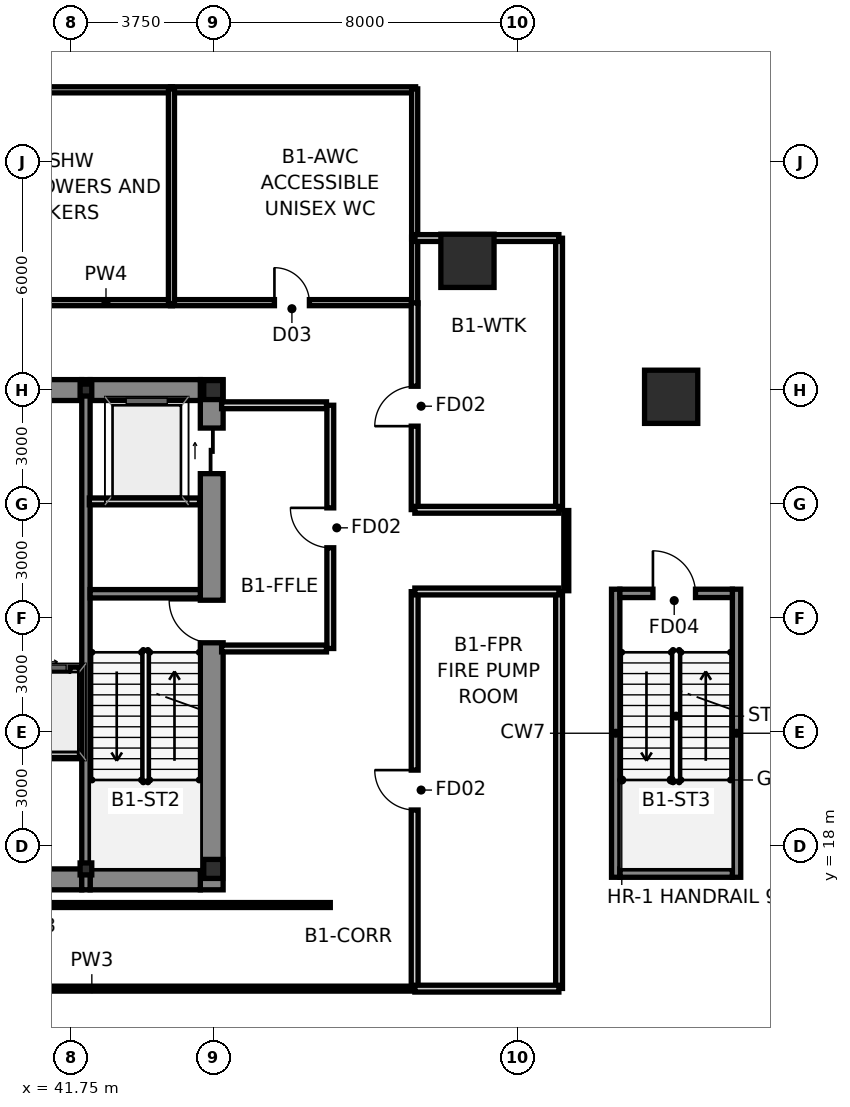
"""IFC4 building model, lengths in metres.
Left out: names, types, materials, properties, quantities, classifications, styles, units other than length and angle.
Written with IfcOpenShell. Run it as: python <this file> out.ifc"""

import sys

from ifc_helpers import new_model, si_unit, direction, frame, frame_2d, origin, origin_2d, place, context, subcontext, project, spatial, rectangle, hollow_rectangle, i_section, extrude, source, transform, mapped, element, fill, save


model = new_model("IFC4")
c1 = context("Model", 3, precision=1e-05, world=origin(), true_north=direction((0.0, 1.0)))
c2 = subcontext(c1, "Body", "Model", "MODEL_VIEW")
j1 = project(units=[si_unit("LENGTHUNIT", "METRE"), si_unit("PLANEANGLEUNIT", "RADIAN")], contexts=[c1])
p1 = place(None, origin())
s1 = spatial("IfcSite", under=j1, at=p1, CompositionType="ELEMENT")
p2 = place(p1, origin())
s2 = spatial("IfcBuilding", under=s1, at=p2, CompositionType="ELEMENT")
p3 = place(p2, frame((0.0, 0.0, -4.8)))
s3 = spatial("IfcBuildingStorey", under=s2, at=p3, CompositionType="ELEMENT", Elevation=-4.8)
m1 = source(origin(), c2, "Body", "SweptSolid", [
    extrude(i_section(OverallWidth=0.5, OverallDepth=0.5, WebThickness=0.028, FlangeThickness=0.04, at=origin_2d()), origin(), (0.0, 0.0, 1.0), 4.8),
])
for number, where, z_axis, x_axis in (
    (1, (45.5, 17.4, 0.0), (0.0, 0.0, 1.0), (1.0, 0.0, 0.0)),
    (2, (45.5, 30.0, 0.0), (0.0, 0.0, 1.0), (1.0, 0.0, 0.0)),
):
    element("IfcColumn", number, at=place(p3, frame(where, z_axis=z_axis, x_axis=x_axis)), inside=s3, PredefinedType="COLUMN", context=c2, shape_type="MappedRepresentation", body=[
        mapped(m1, transform((0.0, 0.0, 0.0), scale=1.0)),
    ])
m2 = source(origin(), c2, "Body", "SweptSolid", [
    extrude(i_section(OverallWidth=0.307, OverallDepth=0.315, WebThickness=0.012, FlangeThickness=0.019, at=origin_2d()), origin(), (0.0, 0.0, 1.0), 4.8),
])
for number, where, z_axis, x_axis in (
    (3, (42.15, 17.4, 0.0), (0.0, 0.0, 1.0), (1.0, 0.0, 0.0)),
    (4, (42.15, 30.0, 0.0), (0.0, 0.0, 1.0), (1.0, 0.0, 0.0)),
):
    element("IfcColumn", number, at=place(p3, frame(where, z_axis=z_axis, x_axis=x_axis)), inside=s3, PredefinedType="COLUMN", context=c2, shape_type="MappedRepresentation", body=[
        mapped(m2, transform((0.0, 0.0, 0.0), scale=1.0)),
    ])
p4 = place(p3, frame((45.46, 16.85, 0.0), z_axis=(0.0, 0.0, 1.0), x_axis=(0.0, 1.0, 0.0)))
e5 = element("IfcWall", 5, at=p4, inside=s3, PredefinedType="SHEAR", context=c2, shape_type="SweptSolid", body=[
    extrude(rectangle(XDim=13.425, YDim=0.6, at=frame_2d((6.712, 0.0))), origin(), (0.0, 0.0, 1.0), 4.8),
])
p5 = place(p4, frame((6.5, 0.0, 0.0)))
e6 = element("IfcOpeningElement", 6, at=p5, cuts=e5, PredefinedType="OPENING", context=c2, shape_type="SweptSolid", body=[
    extrude(rectangle(XDim=1.12, YDim=2.15, at=frame_2d((0.56, 1.075))), frame((0.0, 0.312, 0.0), z_axis=(0.0, -1.0, 0.0), x_axis=(1.0, 0.0, 0.0)), (0.0, 0.0, 1.0), 0.624),
])
p6 = place(p4, frame((10.95, 0.0, 0.0)))
e7 = element("IfcOpeningElement", 7, at=p6, cuts=e5, PredefinedType="OPENING", context=c2, shape_type="SweptSolid", body=[
    extrude(rectangle(XDim=1.2, YDim=2.2, at=frame_2d((0.6, 1.1))), frame((0.0, 0.312, 0.0), z_axis=(0.0, -1.0, 0.0), x_axis=(1.0, 0.0, 0.0)), (0.0, 0.0, 1.0), 0.624),
])
p7 = place(p3, frame((33.96, 17.125, 0.0), z_axis=(0.0, 0.0, 1.0), x_axis=(1.0, 0.0, 0.0)))
e8 = element("IfcWall", 8, at=p7, inside=s3, PredefinedType="SHEAR", context=c2, shape_type="SweptSolid", body=[
    extrude(rectangle(XDim=8.08, YDim=0.55, at=frame_2d((4.04, 0.0))), origin(), (0.0, 0.0, 1.0), 4.8),
])
p8 = place(p3, frame((42.26, 17.125, 0.0), z_axis=(0.0, 0.0, 1.0), x_axis=(1.0, 0.0, 0.0)))
e9 = element("IfcWall", 9, at=p8, inside=s3, PredefinedType="SHEAR", context=c2, shape_type="SweptSolid", body=[
    extrude(rectangle(XDim=2.9, YDim=0.55, at=frame_2d((1.45, 0.0))), origin(), (0.0, 0.0, 1.0), 4.8),
])
p9 = place(p3, frame((40.16, 30.0, 0.0), z_axis=(0.0, 0.0, 1.0), x_axis=(1.0, 0.0, 0.0)))
e10 = element("IfcWall", 10, at=p9, inside=s3, PredefinedType="SHEAR", context=c2, shape_type="SweptSolid", body=[
    extrude(rectangle(XDim=1.88, YDim=0.55, at=frame_2d((0.94, 0.0))), origin(), (0.0, 0.0, 1.0), 4.8),
])
p10 = place(p3, frame((42.26, 30.0, 0.0), z_axis=(0.0, 0.0, 1.0), x_axis=(1.0, 0.0, 0.0)))
e11 = element("IfcWall", 11, at=p10, inside=s3, PredefinedType="SHEAR", context=c2, shape_type="SweptSolid", body=[
    extrude(rectangle(XDim=2.9, YDim=0.55, at=frame_2d((1.45, 0.0))), origin(), (0.0, 0.0, 1.0), 4.8),
])
p11 = place(p3, frame((42.15, 16.85, 0.0), z_axis=(0.0, 0.0, 1.0), x_axis=(0.0, 1.0, 0.0)))
e12 = element("IfcWall", 12, at=p11, inside=s3, PredefinedType="SHEAR", context=c2, shape_type="SweptSolid", body=[
    extrude(rectangle(XDim=13.425, YDim=0.22, at=frame_2d((6.712, 0.0))), origin(), (0.0, 0.0, 1.0), 4.8),
])
p12 = place(p3, frame((42.26, 24.64, 0.0), z_axis=(0.0, 0.0, 1.0), x_axis=(1.0, 0.0, 0.0)))
e13 = element("IfcWall", 13, at=p12, inside=s3, PredefinedType="SHEAR", context=c2, shape_type="SweptSolid", body=[
    extrude(rectangle(XDim=2.9, YDim=0.22, at=frame_2d((1.45, 0.0))), origin(), (0.0, 0.0, 1.0), 4.8),
])
for number, where, z_axis, x_axis in (
    (14, (56.09, 17.18, 0.0), (0.0, 0.0, 1.0), (0.0, 1.0, 0.0)),
    (15, (59.27, 17.18, 0.0), (0.0, 0.0, 1.0), (0.0, 1.0, 0.0)),
):
    element("IfcWall", number, at=place(p3, frame(where, z_axis=z_axis, x_axis=x_axis)), inside=s3, PredefinedType="SHEAR", context=c2, shape_type="SweptSolid", body=[
        extrude(rectangle(XDim=7.58, YDim=0.22, at=frame_2d((3.79, 0.0))), origin(), (0.0, 0.0, 1.0), 4.8),
    ])
p13 = place(p3, frame((56.2, 17.29, 0.0), z_axis=(0.0, 0.0, 1.0), x_axis=(1.0, 0.0, 0.0)))
e16 = element("IfcWall", 16, at=p13, inside=s3, PredefinedType="SHEAR", context=c2, shape_type="SweptSolid", body=[
    extrude(rectangle(XDim=2.96, YDim=0.22, at=frame_2d((1.48, 0.0))), origin(), (0.0, 0.0, 1.0), 4.8),
])
p14 = place(p3, frame((56.2, 24.65, 0.0), z_axis=(0.0, 0.0, 1.0), x_axis=(1.0, 0.0, 0.0)))
e17 = element("IfcWall", 17, at=p14, inside=s3, PredefinedType="SHEAR", context=c2, shape_type="SweptSolid", body=[
    extrude(rectangle(XDim=2.96, YDim=0.22, at=frame_2d((1.48, 0.0))), origin(), (0.0, 0.0, 1.0), 4.8),
])
p15 = place(p14, frame((0.87, 0.0, 0.0)))
e18 = element("IfcOpeningElement", 18, at=p15, cuts=e17, PredefinedType="OPENING", context=c2, shape_type="SweptSolid", body=[
    extrude(rectangle(XDim=1.12, YDim=2.15, at=frame_2d((0.56, 1.075))), frame((0.0, 0.122, 0.0), z_axis=(0.0, -1.0, 0.0), x_axis=(1.0, 0.0, 0.0)), (0.0, 0.0, 1.0), 0.244),
])
m3 = source(origin(), c2, "Body", "SweptSolid", [
    extrude(hollow_rectangle(XDim=1.4, YDim=1.4, WallThickness=0.08, at=origin_2d()), origin(), (0.0, 0.0, 1.0), 4.801),
])
p16 = place(p3, frame((57.549, 29.823, 0.0), z_axis=(-0.014899529501, -0.013780793498, 0.999794025663), x_axis=(0.679008224545, -0.734130663438, 0.0)))
e19 = element("IfcColumn", 19, at=p16, inside=s3, PredefinedType="COLUMN", context=c2, shape_type="MappedRepresentation", body=[
    mapped(m3, transform((0.0, 0.0, 0.0), scale=1.0)),
])
m4 = source(origin(), c2, "Body", "SweptSolid", [
    extrude(hollow_rectangle(XDim=1.4, YDim=1.4, WallThickness=0.08, at=origin_2d()), origin(), (0.0, 0.0, 1.0), 4.8),
])
p17 = place(p3, frame((52.189, 33.4, 0.0), z_axis=(0.0, 0.0, 1.0), x_axis=(1.0, 0.0, 0.0)))
e20 = element("IfcColumn", 20, at=p17, inside=s3, PredefinedType="COLUMN", context=c2, shape_type="MappedRepresentation", body=[
    mapped(m4, transform((0.0, 0.0, 0.0), scale=1.0)),
])
p18 = place(p3, frame((40.28, 22.62, 0.0), z_axis=(0.0, 0.0, 1.0), x_axis=(1.0, 0.0, 0.0)))
e21 = element("IfcWall", 21, at=p18, inside=s3, PredefinedType="PARTITIONING", context=c2, shape_type="SweptSolid", body=[
    extrude(rectangle(XDim=1.7, YDim=0.18, at=frame_2d((0.85, 0.0))), origin(), (0.0, 0.0, 1.0), 4.48),
])
p19 = place(p18, frame((0.35, 0.0, 0.0)))
e22 = element("IfcOpeningElement", 22, at=p19, cuts=e21, PredefinedType="OPENING", context=c2, shape_type="SweptSolid", body=[
    extrude(rectangle(XDim=1.1, YDim=2.2, at=frame_2d((0.55, 1.1))), frame((0.0, 0.102, 0.0), z_axis=(0.0, -1.0, 0.0), x_axis=(1.0, 0.0, 0.0)), (0.0, 0.0, 1.0), 0.204),
])
p20 = place(p3, frame((48.58, 23.2, 0.0), z_axis=(0.0, 0.0, 1.0), x_axis=(0.0, 1.0, 0.0)))
e23 = element("IfcWall", 23, at=p20, inside=s3, PredefinedType="PARTITIONING", context=c2, shape_type="SweptSolid", body=[
    extrude(rectangle(XDim=6.4, YDim=0.18, at=frame_2d((3.2, 0.0))), origin(), (0.0, 0.0, 1.0), 4.48),
])
p21 = place(p20, frame((2.65, 0.0, 0.0)))
e24 = element("IfcOpeningElement", 24, at=p21, cuts=e23, PredefinedType="OPENING", context=c2, shape_type="SweptSolid", body=[
    extrude(rectangle(XDim=1.05, YDim=2.15, at=frame_2d((0.525, 1.075))), frame((0.0, 0.102, 0.0), z_axis=(0.0, -1.0, 0.0), x_axis=(1.0, 0.0, 0.0)), (0.0, 0.0, 1.0), 0.204),
])
p22 = place(p3, frame((45.72, 23.2, 0.0), z_axis=(0.0, 0.0, 1.0), x_axis=(1.0, 0.0, 0.0)))
e25 = element("IfcWall", 25, at=p22, inside=s3, PredefinedType="PARTITIONING", context=c2, shape_type="SweptSolid", body=[
    extrude(rectangle(XDim=2.76, YDim=0.18, at=frame_2d((1.38, 0.0))), origin(), (0.0, 0.0, 1.0), 4.48),
])
p23 = place(p3, frame((45.72, 29.6, 0.0), z_axis=(0.0, 0.0, 1.0), x_axis=(1.0, 0.0, 0.0)))
e26 = element("IfcWall", 26, at=p23, inside=s3, PredefinedType="PARTITIONING", context=c2, shape_type="SweptSolid", body=[
    extrude(rectangle(XDim=2.76, YDim=0.18, at=frame_2d((1.38, 0.0))), origin(), (0.0, 0.0, 1.0), 3.854),
])
p24 = place(p3, frame((42.24, 27.07, 0.0), z_axis=(0.0, 0.0, 1.0), x_axis=(1.0, 0.0, 0.0)))
e27 = element("IfcWall", 27, at=p24, inside=s3, PredefinedType="PARTITIONING", context=c2, shape_type="SweptSolid", body=[
    extrude(rectangle(XDim=2.9, YDim=0.18, at=frame_2d((1.45, 0.0))), origin(), (0.0, 0.0, 1.0), 4.48),
])
p25 = place(p3, frame((40.22, 20.42, 0.0), z_axis=(0.0, 0.0, 1.0), x_axis=(1.0, 0.0, 0.0)))
e28 = element("IfcWall", 28, at=p25, inside=s3, PredefinedType="PARTITIONING", context=c2, shape_type="SweptSolid", body=[
    extrude(rectangle(XDim=1.76, YDim=0.18, at=frame_2d((0.88, 0.0))), origin(), (0.0, 0.0, 1.0), 4.48),
])
p26 = place(p3, frame((36.575, 32.3, 0.0), z_axis=(0.0, 0.0, 1.0), x_axis=(1.0, 0.0, 0.0)))
e29 = element("IfcWall", 29, at=p26, inside=s3, PredefinedType="PLUMBINGWALL", context=c2, shape_type="SweptSolid", body=[
    extrude(rectangle(XDim=7.85, YDim=0.16, at=frame_2d((3.925, 0.0))), origin(), (0.0, 0.0, 1.0), 4.48),
])
p27 = place(p26, frame((3.435, 0.0, 0.0)))
e30 = element("IfcOpeningElement", 30, at=p27, cuts=e29, PredefinedType="OPENING", context=c2, shape_type="SweptSolid", body=[
    extrude(rectangle(XDim=0.92, YDim=2.1, at=frame_2d((0.46, 1.05))), frame((0.0, 0.092, 0.0), z_axis=(0.0, -1.0, 0.0), x_axis=(1.0, 0.0, 0.0)), (0.0, 0.0, 1.0), 0.184),
])
p28 = place(p3, frame((36.575, 37.9, 0.0), z_axis=(0.0, 0.0, 1.0), x_axis=(1.0, 0.0, 0.0)))
e31 = element("IfcWall", 31, at=p28, inside=s3, PredefinedType="PLUMBINGWALL", context=c2, shape_type="SweptSolid", body=[
    extrude(rectangle(XDim=7.85, YDim=0.16, at=frame_2d((3.925, 0.0))), origin(), (0.0, 0.0, 1.0), 4.48),
])
p29 = place(p3, frame((44.375, 32.3, 0.0), z_axis=(0.0, 0.0, 1.0), x_axis=(1.0, 0.0, 0.0)))
e32 = element("IfcWall", 32, at=p29, inside=s3, PredefinedType="PLUMBINGWALL", context=c2, shape_type="SweptSolid", body=[
    extrude(rectangle(XDim=6.45, YDim=0.16, at=frame_2d((3.225, 0.0))), origin(), (0.0, 0.0, 1.0), 4.48),
])
p30 = place(p29, frame((2.735, 0.0, 0.0)))
e33 = element("IfcOpeningElement", 33, at=p30, cuts=e32, PredefinedType="OPENING", context=c2, shape_type="SweptSolid", body=[
    extrude(rectangle(XDim=0.92, YDim=2.1, at=frame_2d((0.46, 1.05))), frame((0.0, 0.092, 0.0), z_axis=(0.0, -1.0, 0.0), x_axis=(1.0, 0.0, 0.0)), (0.0, 0.0, 1.0), 0.184),
])
p31 = place(p3, frame((44.375, 37.9, 0.0), z_axis=(0.0, 0.0, 1.0), x_axis=(1.0, 0.0, 0.0)))
e34 = element("IfcWall", 34, at=p31, inside=s3, PredefinedType="PLUMBINGWALL", context=c2, shape_type="SweptSolid", body=[
    extrude(rectangle(XDim=6.45, YDim=0.16, at=frame_2d((3.225, 0.0))), origin(), (0.0, 0.0, 1.0), 4.48),
])
p32 = place(p3, frame((44.4, 32.275, 0.0), z_axis=(0.0, 0.0, 1.0), x_axis=(0.0, 1.0, 0.0)))
e35 = element("IfcWall", 35, at=p32, inside=s3, PredefinedType="PLUMBINGWALL", context=c2, shape_type="SweptSolid", body=[
    extrude(rectangle(XDim=5.65, YDim=0.16, at=frame_2d((2.825, 0.0))), origin(), (0.0, 0.0, 1.0), 4.48),
])
p33 = place(p3, frame((50.8, 37.925, 0.0), z_axis=(0.0, 0.0, 1.0), x_axis=(0.0, -1.0, 0.0)))
e36 = element("IfcWall", 36, at=p33, inside=s3, PredefinedType="PLUMBINGWALL", context=c2, shape_type="SweptSolid", body=[
    extrude(rectangle(XDim=3.95, YDim=0.16, at=frame_2d((1.975, 0.0))), origin(), (0.0, 0.0, 1.0), 4.48),
])
p34 = place(p3, frame((50.8, 32.275, 0.0), z_axis=(0.0, 0.0, 1.0), x_axis=(0.0, 1.0, 0.0)))
e37 = element("IfcWall", 37, at=p34, inside=s3, PredefinedType="PLUMBINGWALL", context=c2, shape_type="SweptSolid", body=[
    extrude(rectangle(XDim=1.75, YDim=0.16, at=frame_2d((0.875, 0.0))), origin(), (0.0, 0.0, 1.0), 4.48),
])
p35 = place(p3, frame((50.8, 14.255, 0.0), z_axis=(0.0, 0.0, 1.0), x_axis=(0.0, 1.0, 0.0)))
e38 = element("IfcWall", 38, at=p35, inside=s3, PredefinedType="PARTITIONING", context=c2, shape_type="SweptSolid", body=[
    extrude(rectangle(XDim=10.44, YDim=0.18, at=frame_2d((5.22, 0.0))), origin(), (0.0, 0.0, 1.0), 4.48),
])
p36 = place(p35, frame((4.695, 0.0, 0.0)))
e39 = element("IfcOpeningElement", 39, at=p36, cuts=e38, PredefinedType="OPENING", context=c2, shape_type="SweptSolid", body=[
    extrude(rectangle(XDim=1.05, YDim=2.15, at=frame_2d((0.525, 1.075))), frame((0.0, 0.102, 0.0), z_axis=(0.0, -1.0, 0.0), x_axis=(1.0, 0.0, 0.0)), (0.0, 0.0, 1.0), 0.204),
])
p37 = place(p3, frame((54.6, 14.255, 0.0), z_axis=(0.0, 0.0, 1.0), x_axis=(0.0, 1.0, 0.0)))
e40 = element("IfcWall", 40, at=p37, inside=s3, PredefinedType="PARTITIONING", context=c2, shape_type="SweptSolid", body=[
    extrude(rectangle(XDim=10.44, YDim=0.18, at=frame_2d((5.22, 0.0))), origin(), (0.0, 0.0, 1.0), 4.48),
])
p38 = place(p3, frame((54.6, 33.995, 0.0), z_axis=(0.0, 0.0, 1.0), x_axis=(0.0, -1.0, 0.0)))
e41 = element("IfcWall", 41, at=p38, inside=s3, PredefinedType="PARTITIONING", context=c2, shape_type="SweptSolid", body=[
    extrude(rectangle(XDim=7.14, YDim=0.18, at=frame_2d((3.57, 0.0))), origin(), (0.0, 0.0, 1.0), 4.48),
])
p39 = place(p3, frame((50.8, 26.855, 0.0), z_axis=(0.0, 0.0, 1.0), x_axis=(0.0, 1.0, 0.0)))
e42 = element("IfcWall", 42, at=p39, inside=s3, PredefinedType="PARTITIONING", context=c2, shape_type="SweptSolid", body=[
    extrude(rectangle(XDim=5.44, YDim=0.18, at=frame_2d((2.72, 0.0))), origin(), (0.0, 0.0, 1.0), 4.48),
])
p40 = place(p39, frame((2.195, 0.0, 0.0)))
e43 = element("IfcOpeningElement", 43, at=p40, cuts=e42, PredefinedType="OPENING", context=c2, shape_type="SweptSolid", body=[
    extrude(rectangle(XDim=1.05, YDim=2.15, at=frame_2d((0.525, 1.075))), frame((0.0, 0.102, 0.0), z_axis=(0.0, -1.0, 0.0), x_axis=(1.0, 0.0, 0.0)), (0.0, 0.0, 1.0), 0.204),
])
for number, where, z_axis, x_axis in (
    (44, (50.805, 24.7, 0.0), (0.0, 0.0, 1.0), (1.0, 0.0, 0.0)),
    (45, (54.595, 26.85, 0.0), (0.0, 0.0, 1.0), (-1.0, 0.0, 0.0)),
    (46, (50.805, 14.25, 0.0), (0.0, 0.0, 1.0), (1.0, 0.0, 0.0)),
    (47, (50.805, 34.0, 0.0), (0.0, 0.0, 1.0), (1.0, 0.0, 0.0)),
):
    element("IfcWall", number, at=place(p3, frame(where, z_axis=z_axis, x_axis=x_axis)), inside=s3, PredefinedType="PARTITIONING", context=c2, shape_type="SweptSolid", body=[
        extrude(rectangle(XDim=3.79, YDim=0.18, at=frame_2d((1.895, 0.0))), origin(), (0.0, 0.0, 1.0), 4.48),
    ])
p41 = place(p3, frame((33.815, 14.25, 0.0), z_axis=(0.0, 0.0, 1.0), x_axis=(1.0, 0.0, 0.0)))
e48 = element("IfcWall", 48, at=p41, inside=s3, PredefinedType="PARTITIONING", context=c2, shape_type="SweptSolid", body=[
    extrude(rectangle(XDim=16.98, YDim=0.13, at=frame_2d((8.49, 0.0))), origin(), (0.0, 0.0, 1.0), 4.48),
])
p42 = place(p3, frame((48.58, 16.45, 0.0), z_axis=(0.0, 0.0, 1.0), x_axis=(-1.0, 0.0, 0.0)))
e49 = element("IfcWall", 49, at=p42, inside=s3, PredefinedType="PARTITIONING", context=c2, shape_type="SweptSolid", body=[
    extrude(rectangle(XDim=14.765, YDim=0.13, at=frame_2d((7.383, 0.0))), origin(), (0.0, 0.0, 1.0), 4.48),
])
p43 = place(p3, frame((54.79, 24.72, 0.0), z_axis=(0.0, 0.0, 1.0), x_axis=(0.0, 1.0, 0.0)))
e50 = element("IfcWall", 50, at=p43, inside=s3, PredefinedType="PARTITIONING", context=c2, shape_type="SweptSolid", body=[
    extrude(rectangle(XDim=2.11, YDim=0.13, at=frame_2d((1.055, 0.0))), origin(), (0.0, 0.0, 1.0), 4.48),
])
p44 = place(p5, origin())
e51 = element("IfcDoor", 51, at=p44, inside=s3, OperationType="SINGLE_SWING_RIGHT", PredefinedType="DOOR", context=c2, shape_type="SweptSolid", body=[
    extrude(rectangle(XDim=1.12, YDim=2.15, at=frame_2d((0.56, 1.075))), frame((0.0, 0.025, 0.0), z_axis=(0.0, -1.0, 0.0), x_axis=(1.0, 0.0, 0.0)), (0.0, 0.0, 1.0), 0.05),
])
fill(e6, e51)
p45 = place(p6, origin())
e52 = element("IfcDoor", 52, at=p45, inside=s3, OperationType="SLIDING_TO_RIGHT", PredefinedType="DOOR", context=c2, shape_type="SweptSolid", body=[
    extrude(rectangle(XDim=1.2, YDim=2.2, at=frame_2d((0.6, 1.1))), frame((0.0, 0.025, 0.0), z_axis=(0.0, -1.0, 0.0), x_axis=(1.0, 0.0, 0.0)), (0.0, 0.0, 1.0), 0.05),
])
fill(e7, e52)
p46 = place(p15, origin())
e53 = element("IfcDoor", 53, at=p46, inside=s3, OperationType="SINGLE_SWING_LEFT", PredefinedType="DOOR", context=c2, shape_type="SweptSolid", body=[
    extrude(rectangle(XDim=1.12, YDim=2.15, at=frame_2d((0.56, 1.075))), frame((0.0, 0.025, 0.0), z_axis=(0.0, -1.0, 0.0), x_axis=(1.0, 0.0, 0.0)), (0.0, 0.0, 1.0), 0.05),
])
fill(e18, e53)
p47 = place(p19, origin())
e54 = element("IfcDoor", 54, at=p47, inside=s3, OperationType="SLIDING_TO_LEFT", PredefinedType="DOOR", context=c2, shape_type="SweptSolid", body=[
    extrude(rectangle(XDim=1.1, YDim=2.2, at=frame_2d((0.55, 1.1))), frame((0.0, 0.025, 0.0), z_axis=(0.0, -1.0, 0.0), x_axis=(1.0, 0.0, 0.0)), (0.0, 0.0, 1.0), 0.05),
])
fill(e22, e54)
p48 = place(p21, origin())
e55 = element("IfcDoor", 55, at=p48, inside=s3, OperationType="SINGLE_SWING_RIGHT", PredefinedType="DOOR", context=c2, shape_type="SweptSolid", body=[
    extrude(rectangle(XDim=1.05, YDim=2.15, at=frame_2d((0.525, 1.075))), frame((0.0, 0.025, 0.0), z_axis=(0.0, -1.0, 0.0), x_axis=(1.0, 0.0, 0.0)), (0.0, 0.0, 1.0), 0.05),
])
fill(e24, e55)
p49 = place(p30, origin())
e56 = element("IfcDoor", 56, at=p49, inside=s3, OperationType="SINGLE_SWING_LEFT", PredefinedType="DOOR", context=c2, shape_type="SweptSolid", body=[
    extrude(rectangle(XDim=0.92, YDim=2.1, at=frame_2d((0.46, 1.05))), frame((0.0, 0.025, 0.0), z_axis=(0.0, -1.0, 0.0), x_axis=(1.0, 0.0, 0.0)), (0.0, 0.0, 1.0), 0.05),
])
fill(e33, e56)
p50 = place(p36, origin())
e57 = element("IfcDoor", 57, at=p50, inside=s3, OperationType="SINGLE_SWING_RIGHT", PredefinedType="DOOR", context=c2, shape_type="SweptSolid", body=[
    extrude(rectangle(XDim=1.05, YDim=2.15, at=frame_2d((0.525, 1.075))), frame((0.0, 0.025, 0.0), z_axis=(0.0, -1.0, 0.0), x_axis=(1.0, 0.0, 0.0)), (0.0, 0.0, 1.0), 0.05),
])
fill(e39, e57)
p51 = place(p40, origin())
e58 = element("IfcDoor", 58, at=p51, inside=s3, OperationType="SINGLE_SWING_LEFT", PredefinedType="DOOR", context=c2, shape_type="SweptSolid", body=[
    extrude(rectangle(XDim=1.05, YDim=2.15, at=frame_2d((0.525, 1.075))), frame((0.0, 0.025, 0.0), z_axis=(0.0, -1.0, 0.0), x_axis=(1.0, 0.0, 0.0)), (0.0, 0.0, 1.0), 0.05),
])
fill(e43, e58)
save(model, sys.argv[1])
